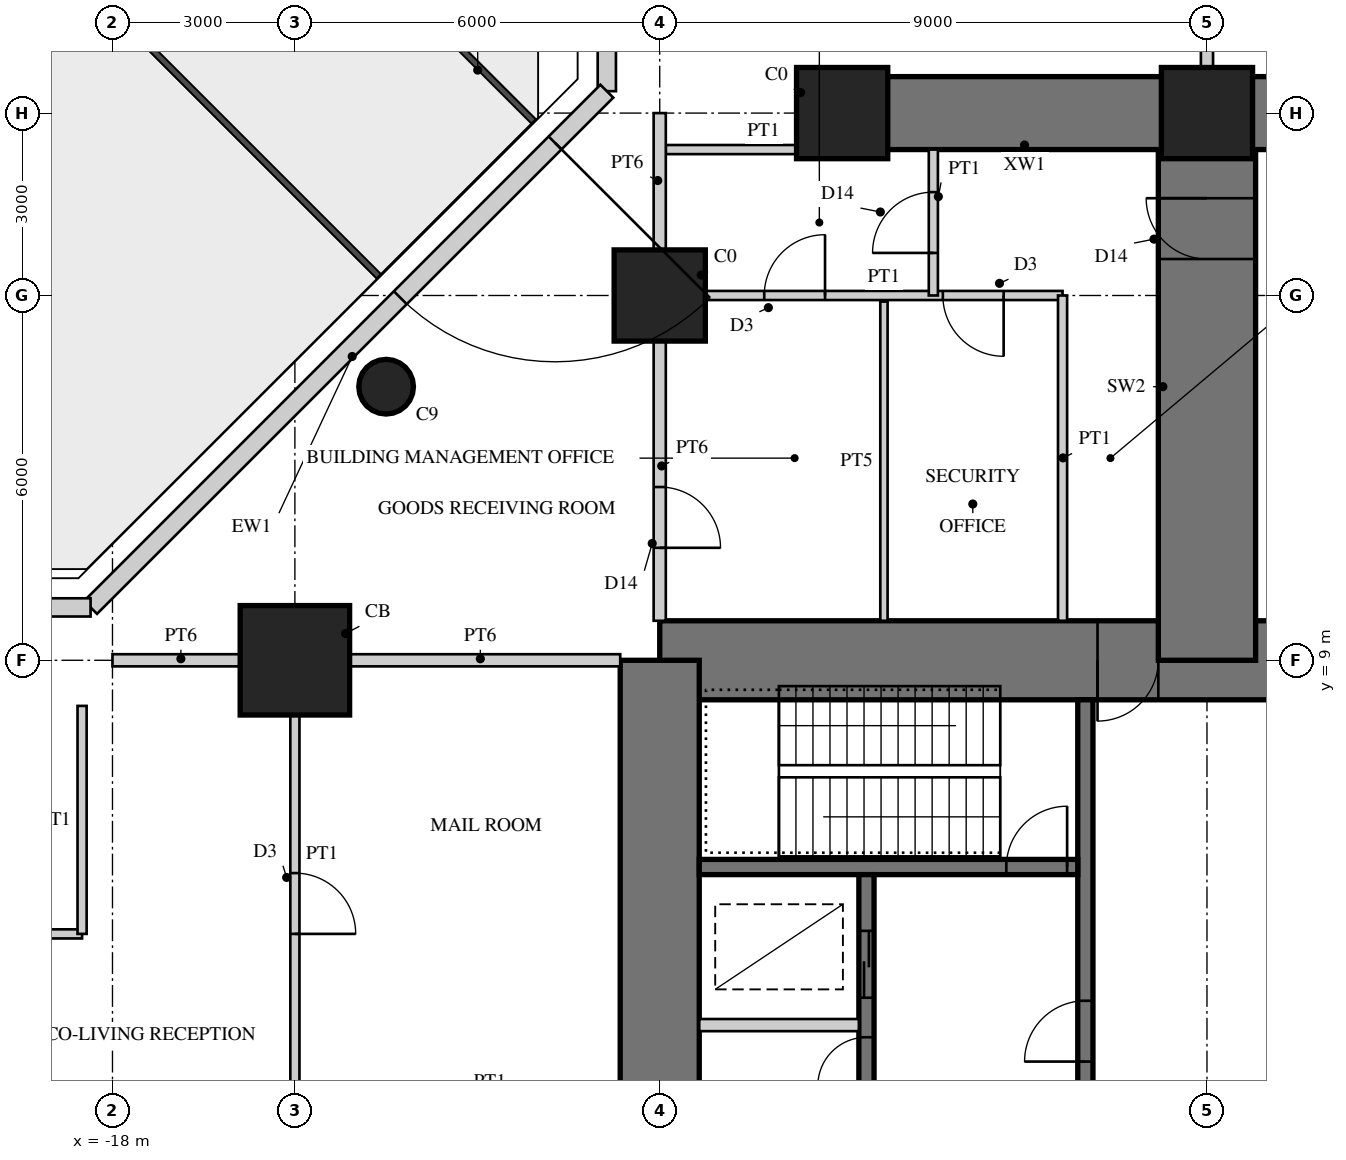
"""IFC4 building model, lengths in metres.
Left out: names, types, materials, properties, quantities, classifications, styles, units other than length and angle.
Written with IfcOpenShell. Run it as: python <this file> out.ifc"""

import sys

from ifc_helpers import new_model, si_unit, direction, frame, frame_2d, origin, origin_2d, place, context, subcontext, project, spatial, rectangle, circle, extrude, element, fill, save


model = new_model("IFC4")
c1 = context("Model", 3, precision=1e-05, world=origin(), true_north=direction((0.0, 1.0)))
c2 = subcontext(c1, "Body", "Model", "MODEL_VIEW")
j1 = project(units=[si_unit("LENGTHUNIT", "METRE"), si_unit("PLANEANGLEUNIT", "RADIAN")], contexts=[c1])
p1 = place(None, origin())
s1 = spatial("IfcSite", under=j1, at=p1, CompositionType="ELEMENT")
p2 = place(p1, origin())
s2 = spatial("IfcBuilding", under=s1, at=p2, CompositionType="ELEMENT")
p3 = place(p2, origin())
s3 = spatial("IfcBuildingStorey", under=s2, at=p3, CompositionType="ELEMENT", Elevation=0.0)
p4 = place(p3, frame((9.0, 9.0, 0.0), z_axis=(0.0, 0.0, 1.0), x_axis=(-1.0, 0.0, 0.0)))
e1 = element("IfcWall", 1, at=p4, inside=s3, PredefinedType="SHEAR", context=c2, shape_type="SweptSolid", body=[
    extrude(rectangle(XDim=18.0, YDim=1.3, at=frame_2d((9.0, 0.0))), origin(), (0.0, 0.0, 1.0), 5.0),
])
p5 = place(p4, frame((9.8, 0.0, 0.0)))
e2 = element("IfcOpeningElement", 2, at=p5, cuts=e1, PredefinedType="OPENING", context=c2, shape_type="SweptSolid", body=[
    extrude(rectangle(XDim=1.0, YDim=2.4, at=frame_2d((0.5, 1.2))), frame((0.0, 0.66, 0.0), z_axis=(0.0, -1.0, 0.0), x_axis=(1.0, 0.0, 0.0)), (0.0, 0.0, 1.0), 1.32),
])
p6 = place(p3, frame((-9.0, 9.0, 0.0), z_axis=(0.0, 0.0, 1.0), x_axis=(0.0, -1.0, 0.0)))
e3 = element("IfcWall", 3, at=p6, inside=s3, PredefinedType="SHEAR", context=c2, shape_type="SweptSolid", body=[
    extrude(rectangle(XDim=18.0, YDim=1.3, at=frame_2d((9.0, 0.0))), origin(), (0.0, 0.0, 1.0), 5.0),
])
p7 = place(p6, frame((9.8, 0.0, 0.0)))
e4 = element("IfcOpeningElement", 4, at=p7, cuts=e3, PredefinedType="OPENING", context=c2, shape_type="SweptSolid", body=[
    extrude(rectangle(XDim=1.0, YDim=2.4, at=frame_2d((0.5, 1.2))), frame((0.0, 0.66, 0.0), z_axis=(0.0, -1.0, 0.0), x_axis=(1.0, 0.0, 0.0)), (0.0, 0.0, 1.0), 1.32),
])
p8 = place(p3, frame((-2.0, 1.675, 0.0), z_axis=(0.0, 0.0, 1.0), x_axis=(0.0, 1.0, 0.0)))
e5 = element("IfcWall", 5, at=p8, inside=s3, PredefinedType="SHEAR", context=c2, shape_type="SweptSolid", body=[
    extrude(rectangle(XDim=6.675, YDim=0.25, at=frame_2d((3.337, 0.0))), origin(), (0.0, 0.0, 1.0), 5.0),
])
p9 = place(p8, frame((0.725, 0.0, 0.0)))
e6 = element("IfcOpeningElement", 6, at=p9, cuts=e5, PredefinedType="OPENING", context=c2, shape_type="SweptSolid", body=[
    extrude(rectangle(XDim=1.0, YDim=2.1, at=frame_2d((0.5, 1.05))), frame((0.0, 0.135, 0.0), z_axis=(0.0, -1.0, 0.0), x_axis=(1.0, 0.0, 0.0)), (0.0, 0.0, 1.0), 0.27),
])
p10 = place(p3, frame((-2.125, 5.6, 0.0), z_axis=(0.0, 0.0, 1.0), x_axis=(-1.0, 0.0, 0.0)))
e7 = element("IfcWall", 7, at=p10, inside=s3, PredefinedType="SHEAR", context=c2, shape_type="SweptSolid", body=[
    extrude(rectangle(XDim=6.225, YDim=0.25, at=frame_2d((3.113, 0.0))), origin(), (0.0, 0.0, 1.0), 5.0),
])
p11 = place(p10, frame((0.175, 0.0, 0.0)))
e8 = element("IfcOpeningElement", 8, at=p11, cuts=e7, PredefinedType="OPENING", context=c2, shape_type="SweptSolid", body=[
    extrude(rectangle(XDim=1.0, YDim=2.1, at=frame_2d((0.5, 1.05))), frame((0.0, 0.135, 0.0), z_axis=(0.0, -1.0, 0.0), x_axis=(1.0, 0.0, 0.0)), (0.0, 0.0, 1.0), 0.27),
])
p12 = place(p3, frame((-5.6, 1.925, 0.0), z_axis=(0.0, 0.0, 1.0), x_axis=(0.0, 1.0, 0.0)))
e9 = element("IfcWall", 9, at=p12, inside=s3, PredefinedType="SHEAR", context=c2, shape_type="SweptSolid", body=[
    extrude(rectangle(XDim=3.55, YDim=0.25, at=frame_2d((1.775, 0.0))), origin(), (0.0, 0.0, 1.0), 5.0),
])
p13 = place(p12, frame((1.525, 0.0, 0.0)))
e10 = element("IfcOpeningElement", 10, at=p13, cuts=e9, PredefinedType="OPENING", context=c2, shape_type="SweptSolid", body=[
    extrude(rectangle(XDim=1.1, YDim=2.2, at=frame_2d((0.55, 1.1))), frame((0.0, 0.135, 0.0), z_axis=(0.0, -1.0, 0.0), x_axis=(1.0, 0.0, 0.0)), (0.0, 0.0, 1.0), 0.27),
])
p14 = place(p12, frame((0.075, 0.0, 0.0)))
e11 = element("IfcOpeningElement", 11, at=p14, cuts=e9, PredefinedType="OPENING", context=c2, shape_type="SweptSolid", body=[
    extrude(rectangle(XDim=0.8, YDim=2.1, at=frame_2d((0.4, 1.05))), frame((0.0, 0.135, 0.0), z_axis=(0.0, -1.0, 0.0), x_axis=(1.0, 0.0, 0.0)), (0.0, 0.0, 1.0), 0.27),
])
p15 = place(p3, frame((-5.725, 3.0, 0.0), z_axis=(0.0, 0.0, 1.0), x_axis=(-1.0, 0.0, 0.0)))
e12 = element("IfcWall", 12, at=p15, inside=s3, PredefinedType="PARTITIONING", context=c2, shape_type="SweptSolid", body=[
    extrude(rectangle(XDim=2.625, YDim=0.2, at=frame_2d((1.312, 0.0))), origin(), (0.0, 0.0, 1.0), 5.0),
])
p16 = place(p3, frame((0.0, 9.0, 0.0), z_axis=(0.0, 0.0, 1.0), x_axis=(0.0, 1.0, 0.0)))
e13 = element("IfcWall", 13, at=p16, inside=s3, PredefinedType="SHEAR", context=c2, shape_type="SweptSolid", body=[
    extrude(rectangle(XDim=9.0, YDim=1.6, at=frame_2d((4.5, 0.0))), origin(), (0.0, 0.0, 1.0), 5.0),
])
p17 = place(p16, frame((6.6, 0.0, 0.0)))
e14 = element("IfcOpeningElement", 14, at=p17, cuts=e13, PredefinedType="OPENING", context=c2, shape_type="SweptSolid", body=[
    extrude(rectangle(XDim=1.0, YDim=2.2, at=frame_2d((0.5, 1.1))), frame((0.0, 0.81, 0.0), z_axis=(0.0, -1.0, 0.0), x_axis=(1.0, 0.0, 0.0)), (0.0, 0.0, 1.0), 1.62),
])
for number, where, z_axis, x_axis in (
    (15, (0.0, 18.0, 0.0), (0.0, 0.0, 1.0), (-1.0, 0.0, 0.0)),
    (16, (0.0, 18.0, 0.0), (0.0, 0.0, 1.0), (1.0, 0.0, 0.0)),
):
    element("IfcWall", number, at=place(p3, frame(where, z_axis=z_axis, x_axis=x_axis)), inside=s3, PredefinedType="SHEAR", context=c2, shape_type="SweptSolid", body=[
        extrude(rectangle(XDim=6.0, YDim=1.2, at=frame_2d((3.0, 0.0))), origin(), (0.0, 0.0, 1.0), 5.0),
    ])
p18 = place(p3, frame((-9.0, 15.0, 0.0), z_axis=(0.0, 0.0, 1.0), x_axis=(1.0, 0.0, 0.0)))
e17 = element("IfcColumn", 17, at=p18, inside=s3, PredefinedType="COLUMN", context=c2, shape_type="SweptSolid", body=[
    extrude(rectangle(XDim=1.5, YDim=1.5, at=origin_2d()), origin(), (0.0, 0.0, 1.0), 5.0),
])
p19 = place(p3, frame((-15.0, 9.0, 0.0), z_axis=(0.0, 0.0, 1.0), x_axis=(1.0, 0.0, 0.0)))
e18 = element("IfcColumn", 18, at=p19, inside=s3, PredefinedType="COLUMN", context=c2, shape_type="SweptSolid", body=[
    extrude(rectangle(XDim=1.8, YDim=1.8, at=origin_2d()), origin(), (0.0, 0.0, 1.0), 5.0),
])
for number, where, z_axis, x_axis in (
    (19, (0.0, 18.0, 0.0), (0.0, 0.0, 1.0), (1.0, 0.0, 0.0)),
    (20, (-6.0, 18.0, 0.0), (0.0, 0.0, 1.0), (1.0, 0.0, 0.0)),
):
    element("IfcColumn", number, at=place(p3, frame(where, z_axis=z_axis, x_axis=x_axis)), inside=s3, PredefinedType="COLUMN", context=c2, shape_type="SweptSolid", body=[
        extrude(rectangle(XDim=1.5, YDim=1.5, at=origin_2d()), origin(), (0.0, 0.0, 1.0), 5.0),
    ])
p20 = place(p3, frame((-13.5, 13.5, 0.0), z_axis=(0.0, 0.0, 1.0), x_axis=(1.0, 0.0, 0.0)))
e21 = element("IfcColumn", 21, at=p20, inside=s3, PredefinedType="COLUMN", context=c2, shape_type="SweptSolid", body=[
    extrude(circle(Radius=0.45, at=origin_2d()), origin(), (0.0, 0.0, 1.0), 5.0),
])
p21 = place(p3, frame((-9.87, 24.36, 0.0), z_axis=(0.0, 0.0, 1.0), x_axis=(0.0, -1.0, 0.0)))
e22 = element("IfcWall", 22, at=p21, inside=s3, PredefinedType="SOLIDWALL", context=c2, shape_type="SweptSolid", body=[
    extrude(rectangle(XDim=6.0, YDim=0.3, at=frame_2d((3.0, 0.0))), origin(), (0.0, 0.0, 1.0), 4.8),
])
p22 = place(p21, frame((1.96, 0.0, 0.3)))
e23 = element("IfcOpeningElement", 23, at=p22, cuts=e22, PredefinedType="OPENING", context=c2, shape_type="SweptSolid", body=[
    extrude(rectangle(XDim=1.2, YDim=3.9, at=frame_2d((0.6, 1.95))), frame((0.0, 0.16, 0.0), z_axis=(0.0, -1.0, 0.0), x_axis=(1.0, 0.0, 0.0)), (0.0, 0.0, 1.0), 0.32),
])
p23 = place(p3, frame((-9.87, 18.36, 0.0), z_axis=(0.0, 0.0, 1.0), x_axis=(-0.707106781187, -0.707106781187, 0.0)))
e24 = element("IfcWall", 24, at=p23, inside=s3, PredefinedType="SOLIDWALL", context=c2, shape_type="SweptSolid", body=[
    extrude(rectangle(XDim=12.007, YDim=0.3, at=frame_2d((6.003, 0.0))), origin(), (0.0, 0.0, 1.0), 4.8),
])
p24 = place(p23, frame((1.204, 0.0, 0.0)))
e25 = element("IfcOpeningElement", 25, at=p24, cuts=e24, PredefinedType="OPENING", context=c2, shape_type="SweptSolid", body=[
    extrude(rectangle(XDim=3.6, YDim=4.2, at=frame_2d((1.8, 2.1))), frame((0.0, 0.16, 0.0), z_axis=(0.0, -1.0, 0.0), x_axis=(1.0, 0.0, 0.0)), (0.0, 0.0, 1.0), 0.32),
])
p25 = place(p3, frame((-18.36, 9.87, 0.0), z_axis=(0.0, 0.0, 1.0), x_axis=(-1.0, 0.0, 0.0)))
e26 = element("IfcWall", 26, at=p25, inside=s3, PredefinedType="SOLIDWALL", context=c2, shape_type="SweptSolid", body=[
    extrude(rectangle(XDim=6.0, YDim=0.3, at=frame_2d((3.0, 0.0))), origin(), (0.0, 0.0, 1.0), 4.8),
])
p26 = place(p25, frame((0.795, 0.0, 0.3)))
e27 = element("IfcOpeningElement", 27, at=p26, cuts=e26, PredefinedType="OPENING", context=c2, shape_type="SweptSolid", body=[
    extrude(rectangle(XDim=3.6, YDim=3.9, at=frame_2d((1.8, 1.95))), frame((0.0, 0.16, 0.0), z_axis=(0.0, -1.0, 0.0), x_axis=(1.0, 0.0, 0.0)), (0.0, 0.0, 1.0), 0.32),
])
p27 = place(p3, frame((-2.375, 15.0, 0.0), z_axis=(0.0, 0.0, 1.0), x_axis=(-1.0, 0.0, 0.0)))
e28 = element("IfcWall", 28, at=p27, inside=s3, PredefinedType="PARTITIONING", context=c2, shape_type="SweptSolid", body=[
    extrude(rectangle(XDim=5.875, YDim=0.15, at=frame_2d((2.938, 0.0))), origin(), (0.0, 0.0, 1.0), 3.85),
])
p28 = place(p27, frame((0.969, 0.0, 0.0)))
e29 = element("IfcOpeningElement", 29, at=p28, cuts=e28, PredefinedType="OPENING", context=c2, shape_type="SweptSolid", body=[
    extrude(rectangle(XDim=1.0, YDim=2.1, at=frame_2d((0.5, 1.05))), frame((0.0, 0.085, 0.0), z_axis=(0.0, -1.0, 0.0), x_axis=(1.0, 0.0, 0.0)), (0.0, 0.0, 1.0), 0.17),
])
p29 = place(p27, frame((3.906, 0.0, 0.0)))
e30 = element("IfcOpeningElement", 30, at=p29, cuts=e28, PredefinedType="OPENING", context=c2, shape_type="SweptSolid", body=[
    extrude(rectangle(XDim=1.0, YDim=2.1, at=frame_2d((0.5, 1.05))), frame((0.0, 0.085, 0.0), z_axis=(0.0, -1.0, 0.0), x_axis=(1.0, 0.0, 0.0)), (0.0, 0.0, 1.0), 0.17),
])
p30 = place(p3, frame((-2.375, 9.65, 0.0), z_axis=(0.0, 0.0, 1.0), x_axis=(0.0, 1.0, 0.0)))
e31 = element("IfcWall", 31, at=p30, inside=s3, PredefinedType="PARTITIONING", context=c2, shape_type="SweptSolid", body=[
    extrude(rectangle(XDim=5.35, YDim=0.15, at=frame_2d((2.675, 0.0))), origin(), (0.0, 0.0, 1.0), 4.8),
])
p31 = place(p3, frame((-5.312, 9.65, 0.0), z_axis=(0.0, 0.0, 1.0), x_axis=(0.0, 1.0, 0.0)))
e32 = element("IfcWall", 32, at=p31, inside=s3, PredefinedType="PLUMBINGWALL", context=c2, shape_type="SweptSolid", body=[
    extrude(rectangle(XDim=5.25, YDim=0.12, at=frame_2d((2.625, 0.0))), origin(), (0.0, 0.0, 1.0), 4.8),
])
p32 = place(p3, frame((-4.5, 15.0, 0.0), z_axis=(0.0, 0.0, 1.0), x_axis=(0.0, 1.0, 0.0)))
e33 = element("IfcWall", 33, at=p32, inside=s3, PredefinedType="PARTITIONING", context=c2, shape_type="SweptSolid", body=[
    extrude(rectangle(XDim=2.4, YDim=0.15, at=frame_2d((1.2, 0.0))), origin(), (0.0, 0.0, 1.0), 4.8),
])
p33 = place(p32, frame((0.7, 0.0, 0.0)))
e34 = element("IfcOpeningElement", 34, at=p33, cuts=e33, PredefinedType="OPENING", context=c2, shape_type="SweptSolid", body=[
    extrude(rectangle(XDim=1.0, YDim=2.2, at=frame_2d((0.5, 1.1))), frame((0.0, 0.085, 0.0), z_axis=(0.0, -1.0, 0.0), x_axis=(1.0, 0.0, 0.0)), (0.0, 0.0, 1.0), 0.17),
])
p34 = place(p3, frame((-6.75, 17.4, 0.0), z_axis=(0.0, 0.0, 1.0), x_axis=(-1.0, 0.0, 0.0)))
e35 = element("IfcWall", 35, at=p34, inside=s3, PredefinedType="PARTITIONING", context=c2, shape_type="SweptSolid", body=[
    extrude(rectangle(XDim=2.15, YDim=0.15, at=frame_2d((1.075, 0.0))), origin(), (0.0, 0.0, 1.0), 4.8),
])
p35 = place(p3, frame((-15.0, 8.25, 0.0), z_axis=(0.0, 0.0, 1.0), x_axis=(0.0, -1.0, 0.0)))
e36 = element("IfcWall", 36, at=p35, inside=s3, PredefinedType="PARTITIONING", context=c2, shape_type="SweptSolid", body=[
    extrude(rectangle(XDim=6.5, YDim=0.15, at=frame_2d((3.25, 0.0))), origin(), (0.0, 0.0, 1.0), 3.85),
])
p36 = place(p35, frame((2.75, 0.0, 0.0)))
e37 = element("IfcOpeningElement", 37, at=p36, cuts=e36, PredefinedType="OPENING", context=c2, shape_type="SweptSolid", body=[
    extrude(rectangle(XDim=1.0, YDim=2.1, at=frame_2d((0.5, 1.05))), frame((0.0, 0.085, 0.0), z_axis=(0.0, -1.0, 0.0), x_axis=(1.0, 0.0, 0.0)), (0.0, 0.0, 1.0), 0.17),
])
p37 = place(p3, frame((-18.5, 4.5, 0.0), z_axis=(0.0, 0.0, 1.0), x_axis=(-1.0, 0.0, 0.0)))
e38 = element("IfcWall", 38, at=p37, inside=s3, PredefinedType="PARTITIONING", context=c2, shape_type="SweptSolid", body=[
    extrude(rectangle(XDim=5.5, YDim=0.15, at=frame_2d((2.75, 0.0))), origin(), (0.0, 0.0, 1.0), 4.8),
])
p38 = place(p37, frame((2.25, 0.0, 0.0)))
e39 = element("IfcOpeningElement", 39, at=p38, cuts=e38, PredefinedType="OPENING", context=c2, shape_type="SweptSolid", body=[
    extrude(rectangle(XDim=1.0, YDim=2.2, at=frame_2d((0.5, 1.1))), frame((0.0, 0.085, 0.0), z_axis=(0.0, -1.0, 0.0), x_axis=(1.0, 0.0, 0.0)), (0.0, 0.0, 1.0), 0.17),
])
p39 = place(p3, frame((-18.5, 8.25, 0.0), z_axis=(0.0, 0.0, 1.0), x_axis=(0.0, -1.0, 0.0)))
e40 = element("IfcWall", 40, at=p39, inside=s3, PredefinedType="PARTITIONING", context=c2, shape_type="SweptSolid", body=[
    extrude(rectangle(XDim=3.75, YDim=0.15, at=frame_2d((1.875, 0.0))), origin(), (0.0, 0.0, 1.0), 4.8),
])
p40 = place(p3, frame((-9.0, 9.65, 0.0), z_axis=(0.0, 0.0, 1.0), x_axis=(0.0, 1.0, 0.0)))
e41 = element("IfcWall", 41, at=p40, inside=s3, PredefinedType="SOLIDWALL", context=c2, shape_type="SweptSolid", body=[
    extrude(rectangle(XDim=4.6, YDim=0.2, at=frame_2d((2.3, 0.0))), origin(), (0.0, 0.0, 1.0), 3.8),
])
p41 = place(p40, frame((1.2, 0.0, 0.0)))
e42 = element("IfcOpeningElement", 42, at=p41, cuts=e41, PredefinedType="OPENING", context=c2, shape_type="SweptSolid", body=[
    extrude(rectangle(XDim=1.0, YDim=2.2, at=frame_2d((0.5, 1.1))), frame((0.0, 0.11, 0.0), z_axis=(0.0, -1.0, 0.0), x_axis=(1.0, 0.0, 0.0)), (0.0, 0.0, 1.0), 0.22),
])
p42 = place(p3, frame((-9.0, 15.75, 0.0), z_axis=(0.0, 0.0, 1.0), x_axis=(0.0, 1.0, 0.0)))
e43 = element("IfcWall", 43, at=p42, inside=s3, PredefinedType="SOLIDWALL", context=c2, shape_type="SweptSolid", body=[
    extrude(rectangle(XDim=2.25, YDim=0.2, at=frame_2d((1.125, 0.0))), origin(), (0.0, 0.0, 1.0), 3.8),
])
p43 = place(p3, frame((-14.25, 9.0, 0.0), z_axis=(0.0, 0.0, 1.0), x_axis=(1.0, 0.0, 0.0)))
e44 = element("IfcWall", 44, at=p43, inside=s3, PredefinedType="SOLIDWALL", context=c2, shape_type="SweptSolid", body=[
    extrude(rectangle(XDim=4.6, YDim=0.2, at=frame_2d((2.3, 0.0))), origin(), (0.0, 0.0, 1.0), 3.8),
])
p44 = place(p3, frame((-18.0, 9.0, 0.0), z_axis=(0.0, 0.0, 1.0), x_axis=(1.0, 0.0, 0.0)))
e45 = element("IfcWall", 45, at=p44, inside=s3, PredefinedType="SOLIDWALL", context=c2, shape_type="SweptSolid", body=[
    extrude(rectangle(XDim=2.25, YDim=0.2, at=frame_2d((1.125, 0.0))), origin(), (0.0, 0.0, 1.0), 3.8),
])
p45 = place(p3, frame((0.0, 18.0, 0.0), z_axis=(0.0, 0.0, 1.0), x_axis=(0.0, 1.0, 0.0)))
e46 = element("IfcWall", 46, at=p45, inside=s3, PredefinedType="SOLIDWALL", context=c2, shape_type="SweptSolid", body=[
    extrude(rectangle(XDim=3.0, YDim=0.2, at=frame_2d((1.5, 0.0))), origin(), (0.0, 0.0, 1.0), 4.8),
])
p46 = place(p45, frame((1.05, 0.0, 0.0)))
e47 = element("IfcOpeningElement", 47, at=p46, cuts=e46, PredefinedType="OPENING", context=c2, shape_type="SweptSolid", body=[
    extrude(rectangle(XDim=1.0, YDim=2.2, at=frame_2d((0.5, 1.1))), frame((0.0, 0.11, 0.0), z_axis=(0.0, -1.0, 0.0), x_axis=(1.0, 0.0, 0.0)), (0.0, 0.0, 1.0), 0.22),
])
p47 = place(p24, origin())
e48 = element("IfcDoor", 48, at=p47, inside=s3, OperationType="USERDEFINED", PredefinedType="DOOR", context=c2, shape_type="SweptSolid", body=[
    extrude(rectangle(XDim=3.6, YDim=4.2, at=frame_2d((1.8, 2.1))), frame((0.0, 0.025, 0.0), z_axis=(0.0, -1.0, 0.0), x_axis=(1.0, 0.0, 0.0)), (0.0, 0.0, 1.0), 0.05),
])
fill(e25, e48)
p48 = place(p28, origin())
e49 = element("IfcDoor", 49, at=p48, inside=s3, OperationType="SINGLE_SWING_LEFT", PredefinedType="DOOR", context=c2, shape_type="SweptSolid", body=[
    extrude(rectangle(XDim=1.0, YDim=2.1, at=frame_2d((0.5, 1.05))), frame((0.0, 0.025, 0.0), z_axis=(0.0, -1.0, 0.0), x_axis=(1.0, 0.0, 0.0)), (0.0, 0.0, 1.0), 0.05),
])
fill(e29, e49)
p49 = place(p29, frame((1.0, 0.0, 0.0), z_axis=(0.0, 0.0, 1.0), x_axis=(-1.0, 0.0, 0.0)))
e50 = element("IfcDoor", 50, at=p49, inside=s3, OperationType="SINGLE_SWING_RIGHT", PredefinedType="DOOR", context=c2, shape_type="SweptSolid", body=[
    extrude(rectangle(XDim=1.0, YDim=2.1, at=frame_2d((0.5, 1.05))), frame((0.0, 0.025, 0.0), z_axis=(0.0, -1.0, 0.0), x_axis=(1.0, 0.0, 0.0)), (0.0, 0.0, 1.0), 0.05),
])
fill(e30, e50)
p50 = place(p33, origin())
e51 = element("IfcDoor", 51, at=p50, inside=s3, OperationType="SINGLE_SWING_LEFT", PredefinedType="DOOR", context=c2, shape_type="SweptSolid", body=[
    extrude(rectangle(XDim=1.0, YDim=2.2, at=frame_2d((0.5, 1.1))), frame((0.0, 0.025, 0.0), z_axis=(0.0, -1.0, 0.0), x_axis=(1.0, 0.0, 0.0)), (0.0, 0.0, 1.0), 0.05),
])
fill(e34, e51)
p51 = place(p36, origin())
e52 = element("IfcDoor", 52, at=p51, inside=s3, OperationType="SINGLE_SWING_RIGHT", PredefinedType="DOOR", context=c2, shape_type="SweptSolid", body=[
    extrude(rectangle(XDim=1.0, YDim=2.1, at=frame_2d((0.5, 1.05))), frame((0.0, 0.025, 0.0), z_axis=(0.0, -1.0, 0.0), x_axis=(1.0, 0.0, 0.0)), (0.0, 0.0, 1.0), 0.05),
])
fill(e37, e52)
p52 = place(p41, frame((1.0, 0.0, 0.0), z_axis=(0.0, 0.0, 1.0), x_axis=(-1.0, 0.0, 0.0)))
e53 = element("IfcDoor", 53, at=p52, inside=s3, OperationType="SINGLE_SWING_RIGHT", PredefinedType="DOOR", context=c2, shape_type="SweptSolid", body=[
    extrude(rectangle(XDim=1.0, YDim=2.2, at=frame_2d((0.5, 1.1))), frame((0.0, 0.025, 0.0), z_axis=(0.0, -1.0, 0.0), x_axis=(1.0, 0.0, 0.0)), (0.0, 0.0, 1.0), 0.05),
])
fill(e42, e53)
p53 = place(p17, origin())
e54 = element("IfcDoor", 54, at=p53, inside=s3, OperationType="SINGLE_SWING_RIGHT", PredefinedType="DOOR", context=c2, shape_type="SweptSolid", body=[
    extrude(rectangle(XDim=1.0, YDim=2.2, at=frame_2d((0.5, 1.1))), frame((0.0, 0.025, 0.0), z_axis=(0.0, -1.0, 0.0), x_axis=(1.0, 0.0, 0.0)), (0.0, 0.0, 1.0), 0.05),
])
fill(e14, e54)
p54 = place(p5, origin())
e55 = element("IfcDoor", 55, at=p54, inside=s3, OperationType="SINGLE_SWING_RIGHT", PredefinedType="DOOR", context=c2, shape_type="SweptSolid", body=[
    extrude(rectangle(XDim=1.0, YDim=2.4, at=frame_2d((0.5, 1.2))), frame((0.0, 0.055, 0.0), z_axis=(0.0, -1.0, 0.0), x_axis=(1.0, 0.0, 0.0)), (0.0, 0.0, 1.0), 0.05),
])
fill(e2, e55)
p55 = place(p9, origin())
e56 = element("IfcDoor", 56, at=p55, inside=s3, OperationType="SINGLE_SWING_LEFT", PredefinedType="DOOR", context=c2, shape_type="SweptSolid", body=[
    extrude(rectangle(XDim=1.0, YDim=2.1, at=frame_2d((0.5, 1.05))), frame((0.0, 0.025, 0.0), z_axis=(0.0, -1.0, 0.0), x_axis=(1.0, 0.0, 0.0)), (0.0, 0.0, 1.0), 0.05),
])
fill(e6, e56)
p56 = place(p11, frame((1.0, 0.0, 0.0), z_axis=(0.0, 0.0, 1.0), x_axis=(-1.0, 0.0, 0.0)))
e57 = element("IfcDoor", 57, at=p56, inside=s3, OperationType="SINGLE_SWING_RIGHT", PredefinedType="DOOR", context=c2, shape_type="SweptSolid", body=[
    extrude(rectangle(XDim=1.0, YDim=2.1, at=frame_2d((0.5, 1.05))), frame((0.0, 0.025, 0.0), z_axis=(0.0, -1.0, 0.0), x_axis=(1.0, 0.0, 0.0)), (0.0, 0.0, 1.0), 0.05),
])
fill(e8, e57)
p57 = place(p13, origin())
e58 = element("IfcDoor", 58, at=p57, inside=s3, OperationType="DOUBLE_DOOR_SLIDING", PredefinedType="DOOR", context=c2, shape_type="SweptSolid", body=[
    extrude(rectangle(XDim=1.1, YDim=2.2, at=frame_2d((0.55, 1.1))), frame((0.0, 0.025, 0.0), z_axis=(0.0, -1.0, 0.0), x_axis=(1.0, 0.0, 0.0)), (0.0, 0.0, 1.0), 0.05),
])
fill(e10, e58)
p58 = place(p14, origin())
e59 = element("IfcDoor", 59, at=p58, inside=s3, OperationType="SINGLE_SWING_LEFT", PredefinedType="DOOR", context=c2, shape_type="SweptSolid", body=[
    extrude(rectangle(XDim=0.8, YDim=2.1, at=frame_2d((0.4, 1.05))), frame((0.0, 0.025, 0.0), z_axis=(0.0, -1.0, 0.0), x_axis=(1.0, 0.0, 0.0)), (0.0, 0.0, 1.0), 0.05),
])
fill(e11, e59)
save(model, sys.argv[1])
